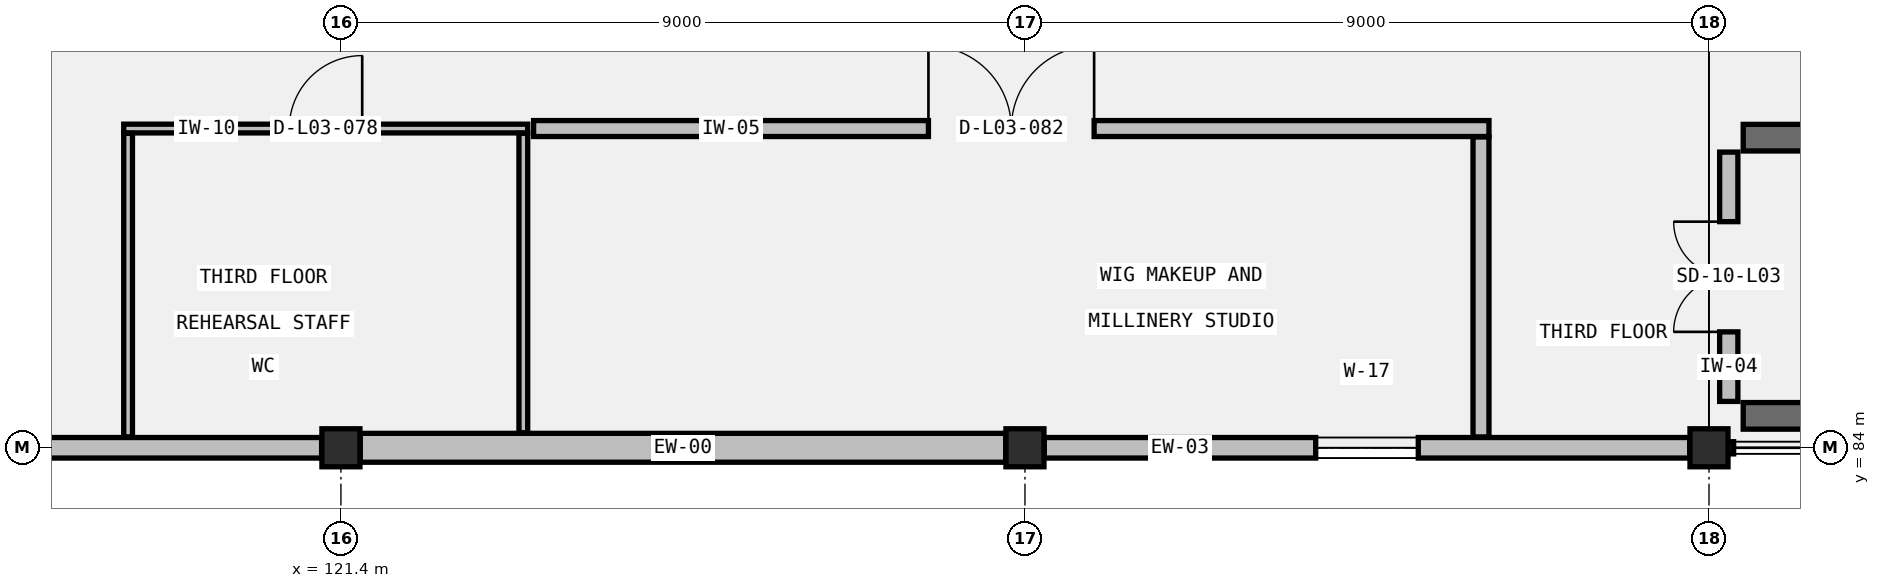
"""IFC4 building model, lengths in metres.
Left out: names, types, materials, properties, quantities, classifications, styles, units other than length and angle.
Written with IfcOpenShell. Run it as: python <this file> out.ifc"""

import sys

from ifc_helpers import new_model, si_unit, direction, frame, frame_2d, origin, origin_2d, place, context, subcontext, project, spatial, rectangle, extrude, element, fill, save


model = new_model("IFC4")
c1 = context("Model", 3, precision=1e-05, world=origin(), true_north=direction((0.0, 1.0)))
c2 = subcontext(c1, "Body", "Model", "MODEL_VIEW")
j1 = project(units=[si_unit("LENGTHUNIT", "METRE"), si_unit("PLANEANGLEUNIT", "RADIAN")], contexts=[c1])
p1 = place(None, origin())
s1 = spatial("IfcSite", under=j1, at=p1, CompositionType="ELEMENT")
p2 = place(p1, origin())
s2 = spatial("IfcBuilding", under=s1, at=p2, CompositionType="ELEMENT")
p3 = place(p2, frame((0.0, 0.0, 14.6)))
s3 = spatial("IfcBuildingStorey", under=s2, at=p3, CompositionType="ELEMENT", Elevation=14.6)
for number, where, z_axis, x_axis in (
    (1, (121.4, 84.0, 0.0), (0.0, 0.0, 1.0), (1.0, 0.0, 0.0)),
    (2, (130.4, 84.0, 0.0), (0.0, 0.0, 1.0), (1.0, 0.0, 0.0)),
    (3, (139.4, 84.0, 0.0), (0.0, 0.0, 1.0), (1.0, 0.0, 0.0)),
):
    element("IfcColumn", number, at=place(p3, frame(where, z_axis=z_axis, x_axis=x_axis)), inside=s3, PredefinedType="COLUMN", context=c2, shape_type="SweptSolid", body=[
        extrude(rectangle(XDim=0.5, YDim=0.5, at=origin_2d()), origin(), (0.0, 0.0, 1.0), 4.6),
    ])
for number, where, z_axis, x_axis in (
    (4, (139.85, 84.42, 0.0), (0.0, 0.0, 1.0), (1.0, 0.0, 0.0)),
    (5, (148.0, 88.08, 0.0), (0.0, 0.0, 1.0), (-1.0, 0.0, 0.0)),
):
    element("IfcWall", number, at=place(p3, frame(where, z_axis=z_axis, x_axis=x_axis)), inside=s3, PredefinedType="SHEAR", context=c2, shape_type="SweptSolid", body=[
        extrude(rectangle(XDim=8.15, YDim=0.35, at=frame_2d((4.075, 0.0))), origin(), (0.0, 0.0, 1.0), 4.36),
    ])
p4 = place(p3, frame((112.779, 84.0, 0.0), z_axis=(0.0, 0.0, 1.0), x_axis=(1.0, 0.0, 0.0)))
e6 = element("IfcWall", 6, at=p4, inside=s3, PredefinedType="STANDARD", context=c2, shape_type="SweptSolid", body=[
    extrude(rectangle(XDim=8.367, YDim=0.27, at=frame_2d((4.184, 0.0))), origin(), (0.0, 0.0, 1.0), 3.898),
])
p5 = place(p4, frame((3.708, 0.0, 0.95)))
e7 = element("IfcOpeningElement", 7, at=p5, cuts=e6, PredefinedType="OPENING", context=c2, shape_type="SweptSolid", body=[
    extrude(rectangle(XDim=0.95, YDim=1.55, at=frame_2d((0.475, 0.775))), frame((0.0, 0.145, 0.0), z_axis=(0.0, -1.0, 0.0), x_axis=(1.0, 0.0, 0.0)), (0.0, 0.0, 1.0), 0.29),
])
p6 = place(p3, frame((121.654, 84.0, 0.0), z_axis=(0.0, 0.0, 1.0), x_axis=(1.0, 0.0, 0.0)))
e8 = element("IfcWall", 8, at=p6, inside=s3, PredefinedType="STANDARD", context=c2, shape_type="SweptSolid", body=[
    extrude(rectangle(XDim=8.492, YDim=0.38, at=frame_2d((4.246, 0.0))), origin(), (0.0, 0.0, 1.0), 3.898),
])
p7 = place(p3, frame((130.654, 84.0, 0.0), z_axis=(0.0, 0.0, 1.0), x_axis=(1.0, 0.0, 0.0)))
e9 = element("IfcWall", 9, at=p7, inside=s3, PredefinedType="STANDARD", context=c2, shape_type="SweptSolid", body=[
    extrude(rectangle(XDim=8.492, YDim=0.27, at=frame_2d((4.246, 0.0))), origin(), (0.0, 0.0, 1.0), 3.898),
])
p8 = place(p7, frame((3.571, 0.0, 0.95)))
e10 = element("IfcOpeningElement", 10, at=p8, cuts=e9, PredefinedType="OPENING", context=c2, shape_type="SweptSolid", body=[
    extrude(rectangle(XDim=1.35, YDim=1.85, at=frame_2d((0.675, 0.925))), frame((0.0, 0.145, 0.0), z_axis=(0.0, -1.0, 0.0), x_axis=(1.0, 0.0, 0.0)), (0.0, 0.0, 1.0), 0.29),
])
p9 = place(p3, frame((139.66, 84.61, 0.0), z_axis=(0.0, 0.0, 1.0), x_axis=(0.0, 1.0, 0.0)))
e11 = element("IfcWall", 11, at=p9, inside=s3, PredefinedType="STANDARD", context=c2, shape_type="SweptSolid", body=[
    extrude(rectangle(XDim=3.28, YDim=0.24, at=frame_2d((1.64, 0.0))), origin(), (0.0, 0.0, 1.0), 4.36),
])
p10 = place(p9, frame((0.915, 0.0, 0.0)))
e12 = element("IfcOpeningElement", 12, at=p10, cuts=e11, PredefinedType="OPENING", context=c2, shape_type="SweptSolid", body=[
    extrude(rectangle(XDim=1.45, YDim=2.2, at=frame_2d((0.725, 1.1))), frame((0.0, 0.13, 0.0), z_axis=(0.0, -1.0, 0.0), x_axis=(1.0, 0.0, 0.0)), (0.0, 0.0, 1.0), 0.26),
])
p11 = place(p3, frame((118.542, 88.2, 0.0), z_axis=(0.0, 0.0, 1.0), x_axis=(1.0, 0.0, 0.0)))
e13 = element("IfcWall", 13, at=p11, inside=s3, PredefinedType="PARTITIONING", context=c2, shape_type="SweptSolid", body=[
    extrude(rectangle(XDim=5.315, YDim=0.115, at=frame_2d((2.657, 0.0))), origin(), (0.0, 0.0, 1.0), 3.988),
])
p12 = place(p11, frame((2.177, 0.0, 0.0)))
e14 = element("IfcOpeningElement", 14, at=p12, cuts=e13, PredefinedType="OPENING", context=c2, shape_type="SweptSolid", body=[
    extrude(rectangle(XDim=0.96, YDim=2.08, at=frame_2d((0.48, 1.04))), frame((0.0, 0.067, 0.0), z_axis=(0.0, -1.0, 0.0), x_axis=(1.0, 0.0, 0.0)), (0.0, 0.0, 1.0), 0.135),
])
p13 = place(p3, frame((123.8, 84.198, 0.0), z_axis=(0.0, 0.0, 1.0), x_axis=(0.0, 1.0, 0.0)))
e15 = element("IfcWall", 15, at=p13, inside=s3, PredefinedType="PARTITIONING", context=c2, shape_type="SweptSolid", body=[
    extrude(rectangle(XDim=3.938, YDim=0.115, at=frame_2d((1.969, 0.0))), origin(), (0.0, 0.0, 1.0), 3.898),
])
p14 = place(p3, frame((118.6, 84.143, 0.0), z_axis=(0.0, 0.0, 1.0), x_axis=(0.0, 1.0, 0.0)))
e16 = element("IfcWall", 16, at=p14, inside=s3, PredefinedType="PARTITIONING", context=c2, shape_type="SweptSolid", body=[
    extrude(rectangle(XDim=3.993, YDim=0.115, at=frame_2d((1.997, 0.0))), origin(), (0.0, 0.0, 1.0), 3.898),
])
p15 = place(p3, frame((123.935, 88.2, 0.0), z_axis=(0.0, 0.0, 1.0), x_axis=(1.0, 0.0, 0.0)))
e17 = element("IfcWall", 17, at=p15, inside=s3, PredefinedType="PARTITIONING", context=c2, shape_type="SweptSolid", body=[
    extrude(rectangle(XDim=12.57, YDim=0.21, at=frame_2d((6.285, 0.0))), origin(), (0.0, 0.0, 1.0), 3.988),
])
p16 = place(p15, frame((5.195, 0.0, 0.0)))
e18 = element("IfcOpeningElement", 18, at=p16, cuts=e17, PredefinedType="OPENING", context=c2, shape_type="SweptSolid", body=[
    extrude(rectangle(XDim=2.18, YDim=2.58, at=frame_2d((1.09, 1.29))), frame((0.0, 0.115, 0.0), z_axis=(0.0, -1.0, 0.0), x_axis=(1.0, 0.0, 0.0)), (0.0, 0.0, 1.0), 0.23),
])
p17 = place(p3, frame((136.4, 84.143, 0.0), z_axis=(0.0, 0.0, 1.0), x_axis=(0.0, 1.0, 0.0)))
e19 = element("IfcWall", 19, at=p17, inside=s3, PredefinedType="PARTITIONING", context=c2, shape_type="SweptSolid", body=[
    extrude(rectangle(XDim=3.946, YDim=0.21, at=frame_2d((1.973, 0.0))), origin(), (0.0, 0.0, 1.0), 3.898),
])
p18 = place(p8, origin())
e20 = element("IfcWindow", 20, at=p18, inside=s3, PartitioningType="SINGLE_PANEL", PredefinedType="WINDOW", context=c2, shape_type="SweptSolid", body=[
    extrude(rectangle(XDim=1.35, YDim=1.85, at=frame_2d((0.675, 0.925))), frame((0.0, 0.03, 0.0), z_axis=(0.0, -1.0, 0.0), x_axis=(1.0, 0.0, 0.0)), (0.0, 0.0, 1.0), 0.06),
])
fill(e10, e20)
p19 = place(p10, origin())
e21 = element("IfcDoor", 21, at=p19, inside=s3, OperationType="DOUBLE_DOOR_SINGLE_SWING", PredefinedType="DOOR", context=c2, shape_type="SweptSolid", body=[
    extrude(rectangle(XDim=1.45, YDim=2.2, at=frame_2d((0.725, 1.1))), frame((0.0, 0.025, 0.0), z_axis=(0.0, -1.0, 0.0), x_axis=(1.0, 0.0, 0.0)), (0.0, 0.0, 1.0), 0.05),
])
fill(e12, e21)
p20 = place(p12, origin())
e22 = element("IfcDoor", 22, at=p20, inside=s3, OperationType="SINGLE_SWING_RIGHT", PredefinedType="DOOR", context=c2, shape_type="SweptSolid", body=[
    extrude(rectangle(XDim=0.96, YDim=2.08, at=frame_2d((0.48, 1.04))), frame((0.0, 0.025, 0.0), z_axis=(0.0, -1.0, 0.0), x_axis=(1.0, 0.0, 0.0)), (0.0, 0.0, 1.0), 0.05),
])
fill(e14, e22)
p21 = place(p16, origin())
e23 = element("IfcDoor", 23, at=p21, inside=s3, OperationType="DOUBLE_DOOR_SINGLE_SWING", PredefinedType="DOOR", context=c2, shape_type="SweptSolid", body=[
    extrude(rectangle(XDim=2.18, YDim=2.58, at=frame_2d((1.09, 1.29))), frame((0.0, 0.025, 0.0), z_axis=(0.0, -1.0, 0.0), x_axis=(1.0, 0.0, 0.0)), (0.0, 0.0, 1.0), 0.05),
])
fill(e18, e23)
save(model, sys.argv[1])
